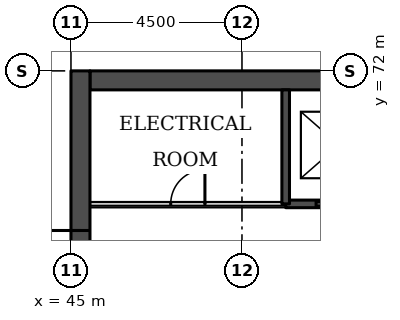
"""IFC4 building model, lengths in metres.
Left out: names, types, materials, properties, quantities, classifications, styles, units other than length and angle.
Written with IfcOpenShell. Run it as: python <this file> out.ifc"""

import sys

from ifc_helpers import new_model, si_unit, direction, frame, frame_2d, origin, place, context, subcontext, project, spatial, rectangle, extrude, element, fill, save


model = new_model("IFC4")
c1 = context("Model", 3, precision=1e-05, world=origin(), true_north=direction((0.0, 1.0)))
c2 = subcontext(c1, "Body", "Model", "MODEL_VIEW")
j1 = project(units=[si_unit("LENGTHUNIT", "METRE"), si_unit("PLANEANGLEUNIT", "RADIAN")], contexts=[c1])
p1 = place(None, origin())
s1 = spatial("IfcSite", under=j1, at=p1, CompositionType="ELEMENT")
p2 = place(p1, origin())
s2 = spatial("IfcBuilding", under=s1, at=p2, CompositionType="ELEMENT")
p3 = place(p2, frame((0.0, 0.0, -4.5)))
s3 = spatial("IfcBuildingStorey", under=s2, at=p3, CompositionType="ELEMENT", Elevation=-4.5)
p4 = place(p3, frame((45.5, 71.75, 0.0), z_axis=(0.0, 0.0, 1.0), x_axis=(1.0, 0.0, 0.0)))
e1 = element("IfcWall", 1, at=p4, inside=s3, PredefinedType="SHEAR", context=c2, shape_type="SweptSolid", body=[
    extrude(rectangle(XDim=21.5, YDim=0.5, at=frame_2d((10.75, 0.0))), origin(), (0.0, 0.0, 1.0), 4.5),
])
p5 = place(p3, frame((45.25, 49.5, 0.0), z_axis=(0.0, 0.0, 1.0), x_axis=(0.0, 1.0, 0.0)))
e2 = element("IfcWall", 2, at=p5, inside=s3, PredefinedType="SHEAR", context=c2, shape_type="SweptSolid", body=[
    extrude(rectangle(XDim=22.5, YDim=0.5, at=frame_2d((11.25, 0.0))), origin(), (0.0, 0.0, 1.0), 4.5),
])
p6 = place(p5, frame((4.2, 0.0, 0.0)))
e3 = element("IfcOpeningElement", 3, at=p6, cuts=e2, PredefinedType="OPENING", context=c2, shape_type="SweptSolid", body=[
    extrude(rectangle(XDim=1.8, YDim=2.1, at=frame_2d((0.9, 1.05))), frame((0.0, 0.26, 0.0), z_axis=(0.0, -1.0, 0.0), x_axis=(1.0, 0.0, 0.0)), (0.0, 0.0, 1.0), 0.52),
])
p7 = place(p5, frame((6.9, 0.0, 0.0)))
e4 = element("IfcOpeningElement", 4, at=p7, cuts=e2, PredefinedType="OPENING", context=c2, shape_type="SweptSolid", body=[
    extrude(rectangle(XDim=1.1, YDim=2.1, at=frame_2d((0.55, 1.05))), frame((0.0, 0.26, 0.0), z_axis=(0.0, -1.0, 0.0), x_axis=(1.0, 0.0, 0.0)), (0.0, 0.0, 1.0), 0.52),
])
p8 = place(p5, frame((13.6, 0.0, 0.0)))
e5 = element("IfcOpeningElement", 5, at=p8, cuts=e2, PredefinedType="OPENING", context=c2, shape_type="SweptSolid", body=[
    extrude(rectangle(XDim=1.1, YDim=2.1, at=frame_2d((0.55, 1.05))), frame((0.0, 0.26, 0.0), z_axis=(0.0, -1.0, 0.0), x_axis=(1.0, 0.0, 0.0)), (0.0, 0.0, 1.0), 0.52),
])
p9 = place(p5, frame((16.5, 0.0, 0.0)))
e6 = element("IfcOpeningElement", 6, at=p9, cuts=e2, PredefinedType="OPENING", context=c2, shape_type="SweptSolid", body=[
    extrude(rectangle(XDim=1.8, YDim=2.1, at=frame_2d((0.9, 1.05))), frame((0.0, 0.26, 0.0), z_axis=(0.0, -1.0, 0.0), x_axis=(1.0, 0.0, 0.0)), (0.0, 0.0, 1.0), 0.52),
])
p10 = place(p3, frame((45.5, 68.5, 0.0), z_axis=(0.0, 0.0, 1.0), x_axis=(1.0, 0.0, 0.0)))
e7 = element("IfcWall", 7, at=p10, inside=s3, PredefinedType="PARTITIONING", context=c2, shape_type="SweptSolid", body=[
    extrude(rectangle(XDim=5.15, YDim=0.1, at=frame_2d((2.575, 0.0))), origin(), (0.0, 0.0, 1.0), 4.1),
])
p11 = place(p10, frame((2.125, 0.0, 0.0)))
e8 = element("IfcOpeningElement", 8, at=p11, cuts=e7, PredefinedType="OPENING", context=c2, shape_type="SweptSolid", body=[
    extrude(rectangle(XDim=0.9, YDim=2.1, at=frame_2d((0.45, 1.05))), frame((0.0, 0.06, 0.0), z_axis=(0.0, -1.0, 0.0), x_axis=(1.0, 0.0, 0.0)), (0.0, 0.0, 1.0), 0.12),
])
p12 = place(p3, frame((50.65, 68.5, 0.0), z_axis=(0.0, 0.0, 1.0), x_axis=(1.0, 0.0, 0.0)))
e9 = element("IfcWall", 9, at=p12, inside=s3, PredefinedType="SOLIDWALL", context=c2, shape_type="SweptSolid", body=[
    extrude(rectangle(XDim=11.2, YDim=0.2, at=frame_2d((5.6, 0.0))), origin(), (0.0, 0.0, 1.0), 4.1),
])
p13 = place(p12, frame((0.8, 0.0, 0.0)))
e10 = element("IfcOpeningElement", 10, at=p13, cuts=e9, PredefinedType="OPENING", context=c2, shape_type="SweptSolid", body=[
    extrude(rectangle(XDim=1.2, YDim=2.1, at=frame_2d((0.6, 1.05))), frame((0.0, 0.11, 0.0), z_axis=(0.0, -1.0, 0.0), x_axis=(1.0, 0.0, 0.0)), (0.0, 0.0, 1.0), 0.22),
])
p14 = place(p12, frame((3.6, 0.0, 0.0)))
e11 = element("IfcOpeningElement", 11, at=p14, cuts=e9, PredefinedType="OPENING", context=c2, shape_type="SweptSolid", body=[
    extrude(rectangle(XDim=1.2, YDim=2.1, at=frame_2d((0.6, 1.05))), frame((0.0, 0.11, 0.0), z_axis=(0.0, -1.0, 0.0), x_axis=(1.0, 0.0, 0.0)), (0.0, 0.0, 1.0), 0.22),
])
p15 = place(p12, frame((6.4, 0.0, 0.0)))
e12 = element("IfcOpeningElement", 12, at=p15, cuts=e9, PredefinedType="OPENING", context=c2, shape_type="SweptSolid", body=[
    extrude(rectangle(XDim=1.2, YDim=2.1, at=frame_2d((0.6, 1.05))), frame((0.0, 0.11, 0.0), z_axis=(0.0, -1.0, 0.0), x_axis=(1.0, 0.0, 0.0)), (0.0, 0.0, 1.0), 0.22),
])
p16 = place(p12, frame((9.2, 0.0, 0.0)))
e13 = element("IfcOpeningElement", 13, at=p16, cuts=e9, PredefinedType="OPENING", context=c2, shape_type="SweptSolid", body=[
    extrude(rectangle(XDim=1.2, YDim=2.1, at=frame_2d((0.6, 1.05))), frame((0.0, 0.11, 0.0), z_axis=(0.0, -1.0, 0.0), x_axis=(1.0, 0.0, 0.0)), (0.0, 0.0, 1.0), 0.22),
])
p17 = place(p3, frame((50.65, 68.5, 0.0), z_axis=(0.0, 0.0, 1.0), x_axis=(0.0, 1.0, 0.0)))
e14 = element("IfcWall", 14, at=p17, inside=s3, PredefinedType="SOLIDWALL", context=c2, shape_type="SweptSolid", body=[
    extrude(rectangle(XDim=3.0, YDim=0.2, at=frame_2d((1.5, 0.0))), origin(), (0.0, 0.0, 1.0), 4.1),
])
p18 = place(p13, origin())
e15 = element("IfcDoor", 15, at=p18, inside=s3, OperationType="DOUBLE_DOOR_SLIDING", PredefinedType="DOOR", context=c2, shape_type="SweptSolid", body=[
    extrude(rectangle(XDim=1.2, YDim=2.1, at=frame_2d((0.6, 1.05))), frame((0.0, 0.025, 0.0), z_axis=(0.0, -1.0, 0.0), x_axis=(1.0, 0.0, 0.0)), (0.0, 0.0, 1.0), 0.05),
])
fill(e10, e15)
p19 = place(p9, origin())
e16 = element("IfcDoor", 16, at=p19, inside=s3, OperationType="SINGLE_SWING_RIGHT", PredefinedType="DOOR", context=c2, shape_type="SweptSolid", body=[
    extrude(rectangle(XDim=1.8, YDim=2.1, at=frame_2d((0.9, 1.05))), frame((0.0, 0.025, 0.0), z_axis=(0.0, -1.0, 0.0), x_axis=(1.0, 0.0, 0.0)), (0.0, 0.0, 1.0), 0.05),
])
fill(e6, e16)
p20 = place(p11, origin())
e17 = element("IfcDoor", 17, at=p20, inside=s3, OperationType="SINGLE_SWING_RIGHT", PredefinedType="DOOR", context=c2, shape_type="SweptSolid", body=[
    extrude(rectangle(XDim=0.9, YDim=2.1, at=frame_2d((0.45, 1.05))), frame((0.0, 0.025, 0.0), z_axis=(0.0, -1.0, 0.0), x_axis=(1.0, 0.0, 0.0)), (0.0, 0.0, 1.0), 0.05),
])
fill(e8, e17)
save(model, sys.argv[1])
